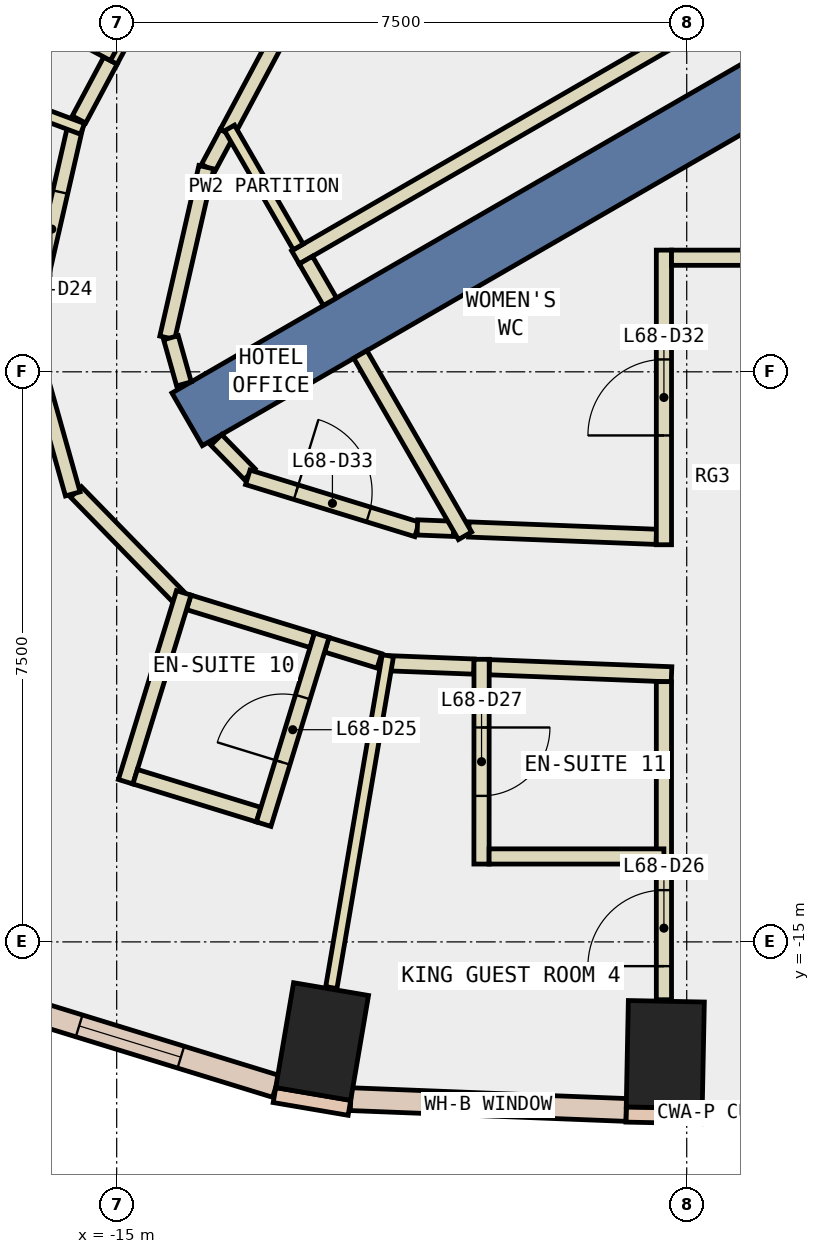
"""IFC4 building model, lengths in metres.
Left out: names, types, materials, properties, quantities, classifications, styles, units other than length and angle.
Written with IfcOpenShell. Run it as: python <this file> out.ifc"""

import sys

from ifc_helpers import new_model, si_unit, direction, frame, frame_2d, origin, origin_2d, place, context, subcontext, project, spatial, polyline, rectangle, outline, extrude, element, fill, save


model = new_model("IFC4")
c1 = context("Model", 3, precision=1e-05, world=origin(), true_north=direction((0.0, 1.0)))
c2 = subcontext(c1, "Body", "Model", "MODEL_VIEW")
j1 = project(units=[si_unit("LENGTHUNIT", "METRE"), si_unit("PLANEANGLEUNIT", "RADIAN")], contexts=[c1])
p1 = place(None, origin())
s1 = spatial("IfcSite", under=j1, at=p1, CompositionType="ELEMENT")
p2 = place(p1, origin())
s2 = spatial("IfcBuilding", under=s1, at=p2, CompositionType="ELEMENT")
p3 = place(p2, frame((0.0, 0.0, 293.6)))
s3 = spatial("IfcBuildingStorey", under=s2, at=p3, CompositionType="ELEMENT", Elevation=293.6)
for number, where, z_axis, x_axis in (
    (1, (-12.297, -16.311, -0.34), (0.0, 0.0, 1.0), (-0.986, 0.168, 0.0)),
    (2, (-7.782, -16.481, -0.34), (0.0, 0.0, 1.0), (-1.0, 0.02, 0.0)),
):
    element("IfcColumn", number, at=place(p3, frame(where, z_axis=z_axis, x_axis=x_axis)), inside=s3, PredefinedType="COLUMN", context=c2, shape_type="SweptSolid", body=[
        extrude(rectangle(XDim=1.0, YDim=1.4, at=origin_2d()), origin(), (0.0, 0.0, 1.0), 3.6),
    ])
p4 = place(p3, frame((0.0, 0.0, -0.34)))
e3 = element("IfcWall", 3, at=p4, inside=s3, PredefinedType="SHEAR", context=c2, shape_type="SweptSolid", body=[
    extrude(outline(polyline([(-9.815, 2.5), (-4.907, -6.0), (-4.619, -5.5), (-9.238, 2.5), (-9.815, 2.5)])), origin(), (0.0, 0.0, 1.0), 3.6),
])
p5 = place(p3, frame((-6.279, -3.625, -0.34), z_axis=(0.0, 0.0, 1.0), x_axis=(-0.866017533419, -0.500013631625, 0.0)))
e4 = element("IfcWall", 4, at=p5, inside=s3, PredefinedType="SHEAR", context=c2, shape_type="SweptSolid", body=[
    extrude(rectangle(XDim=9.0, YDim=0.8, at=frame_2d((4.5, 0.0))), origin(), (0.0, 0.0, 1.0), 3.6),
])
for number, where, z_axis, x_axis in (
    (5, (-12.924, -17.015, 0.0), (0.0, 0.0, 1.0), (0.986, -0.168, 0.0)),
    (6, (-8.298, -17.271, 0.0), (0.0, 0.0, 1.0), (1.0, -0.02, 0.0)),
):
    element("IfcWall", number, at=place(p3, frame(where, z_axis=z_axis, x_axis=x_axis)), inside=s3, PredefinedType="STANDARD", context=c2, shape_type="SweptSolid", body=[
        extrude(rectangle(XDim=1.0, YDim=0.2, at=frame_2d((0.5, 0.0))), origin(), (0.0, 0.0, 1.0), 3.26),
    ])
p6 = place(p3, frame((-11.92, -17.069, 0.0), z_axis=(0.0, 0.0, 1.0), x_axis=(0.999234893779, -0.039110446866, 0.0)))
e7 = element("IfcWall", 7, at=p6, inside=s3, PredefinedType="STANDARD", context=c2, shape_type="SweptSolid", body=[
    extrude(rectangle(XDim=3.627, YDim=0.3, at=frame_2d((1.813, 0.0))), origin(), (0.0, 0.0, 1.0), 3.26),
])
p7 = place(p6, frame((1.113, 0.0, 0.9)))
e8 = element("IfcOpeningElement", 8, at=p7, cuts=e7, PredefinedType="OPENING", context=c2, shape_type="SweptSolid", body=[
    extrude(rectangle(XDim=1.4, YDim=2.0, at=frame_2d((0.7, 1.0))), frame((0.0, 0.16, 0.0), z_axis=(0.0, -1.0, 0.0), x_axis=(1.0, 0.0, 0.0)), (0.0, 0.0, 1.0), 0.32),
])
p8 = place(p3, frame((-16.746, -15.72, 0.0), z_axis=(0.0, 0.0, 1.0), x_axis=(0.955866957005, -0.293799864716, 0.0)))
e9 = element("IfcWall", 9, at=p8, inside=s3, PredefinedType="STANDARD", context=c2, shape_type="SweptSolid", body=[
    extrude(rectangle(XDim=4.02, YDim=0.3, at=frame_2d((2.01, 0.0))), origin(), (0.0, 0.0, 1.0), 3.26),
])
p9 = place(p8, frame((1.31, 0.0, 0.9)))
e10 = element("IfcOpeningElement", 10, at=p9, cuts=e9, PredefinedType="OPENING", context=c2, shape_type="SweptSolid", body=[
    extrude(rectangle(XDim=1.4, YDim=2.0, at=frame_2d((0.7, 1.0))), frame((0.0, 0.16, 0.0), z_axis=(0.0, -1.0, 0.0), x_axis=(1.0, 0.0, 0.0)), (0.0, 0.0, 1.0), 0.32),
])
p10 = place(p3, frame((-10.639, 1.084, 0.0), z_axis=(0.0, 0.0, 1.0), x_axis=(-0.471696599276, -0.881760918975, 0.0)))
e11 = element("IfcWall", 11, at=p10, inside=s3, PredefinedType="PARTITIONING", context=c2, shape_type="SweptSolid", body=[
    extrude(rectangle(XDim=6.172, YDim=0.2, at=frame_2d((3.086, 0.0))), origin(), (0.0, 0.0, 1.0), 3.26),
])
p11 = place(p10, frame((2.458, 0.0, 0.0)))
e12 = element("IfcOpeningElement", 12, at=p11, cuts=e11, PredefinedType="OPENING", context=c2, shape_type="SweptSolid", body=[
    extrude(rectangle(XDim=1.0, YDim=2.1, at=frame_2d((0.5, 1.05))), frame((0.0, 0.11, 0.0), z_axis=(0.0, -1.0, 0.0), x_axis=(1.0, 0.0, 0.0)), (0.0, 0.0, 1.0), 0.22),
])
p12 = place(p3, frame((-10.367, -9.574, 0.0), z_axis=(0.0, 0.0, 1.0), x_axis=(0.999229139158, -0.039257196264, 0.0)))
e13 = element("IfcWall", 13, at=p12, inside=s3, PredefinedType="PARTITIONING", context=c2, shape_type="SweptSolid", body=[
    extrude(rectangle(XDim=2.469, YDim=0.2, at=frame_2d((1.234, 0.0))), origin(), (0.0, 0.0, 1.0), 3.26),
])
p13 = place(p3, frame((-13.55, -4.358, 0.0), z_axis=(0.0, 0.0, 1.0), x_axis=(-0.472169364753, -0.881507850781, 0.0)))
e14 = element("IfcWall", 14, at=p13, inside=s3, PredefinedType="PARTITIONING", context=c2, shape_type="SweptSolid", body=[
    extrude(rectangle(XDim=0.521, YDim=0.2, at=frame_2d((0.26, 0.0))), origin(), (0.0, 0.0, 1.0), 3.26),
])
p14 = place(p3, frame((-13.821, -4.808, 0.0), z_axis=(0.0, 0.0, 1.0), x_axis=(-0.223248099856, -0.97476165595, 0.0)))
e15 = element("IfcWall", 15, at=p14, inside=s3, PredefinedType="PARTITIONING", context=c2, shape_type="SweptSolid", body=[
    extrude(rectangle(XDim=2.302, YDim=0.2, at=frame_2d((1.151, 0.0))), origin(), (0.0, 0.0, 1.0), 3.26),
])
p15 = place(p3, frame((-14.286, -7.051, 0.0), z_axis=(0.0, 0.0, 1.0), x_axis=(0.270633612894, -0.96268242301, 0.0)))
e16 = element("IfcWall", 16, at=p15, inside=s3, PredefinedType="PARTITIONING", context=c2, shape_type="SweptSolid", body=[
    extrude(rectangle(XDim=0.632, YDim=0.2, at=frame_2d((0.316, 0.0))), origin(), (0.0, 0.0, 1.0), 3.26),
])
p16 = place(p3, frame((-13.69, -8.395, 0.0), z_axis=(0.0, 0.0, 1.0), x_axis=(0.698333537371, -0.715772499181, 0.0)))
e17 = element("IfcWall", 17, at=p16, inside=s3, PredefinedType="PARTITIONING", context=c2, shape_type="SweptSolid", body=[
    extrude(rectangle(XDim=0.63, YDim=0.2, at=frame_2d((0.315, 0.0))), origin(), (0.0, 0.0, 1.0), 3.26),
])
p17 = place(p3, frame((-13.275, -8.888, 0.0), z_axis=(0.0, 0.0, 1.0), x_axis=(0.955792602122, -0.294041666654, 0.0)))
e18 = element("IfcWall", 18, at=p17, inside=s3, PredefinedType="PARTITIONING", context=c2, shape_type="SweptSolid", body=[
    extrude(rectangle(XDim=2.33, YDim=0.2, at=frame_2d((1.165, 0.0))), origin(), (0.0, 0.0, 1.0), 3.26),
])
p18 = place(p17, frame((0.665, 0.0, 0.0)))
e19 = element("IfcOpeningElement", 19, at=p18, cuts=e18, PredefinedType="OPENING", context=c2, shape_type="SweptSolid", body=[
    extrude(rectangle(XDim=1.0, YDim=2.1, at=frame_2d((0.5, 1.05))), frame((0.0, 0.11, 0.0), z_axis=(0.0, -1.0, 0.0), x_axis=(1.0, 0.0, 0.0)), (0.0, 0.0, 1.0), 0.22),
])
p19 = place(p3, frame((-11.044, -9.547, 0.0), z_axis=(0.0, 0.0, 1.0), x_axis=(0.999224473046, -0.039375785274, 0.0)))
e20 = element("IfcWall", 20, at=p19, inside=s3, PredefinedType="PARTITIONING", context=c2, shape_type="SweptSolid", body=[
    extrude(rectangle(XDim=0.478, YDim=0.2, at=frame_2d((0.239, 0.0))), origin(), (0.0, 0.0, 1.0), 3.26),
])
p20 = place(p3, frame((-15.496, -4.18, 0.0), z_axis=(0.0, 0.0, 1.0), x_axis=(0.471280380621, 0.881983448167, 0.0)))
e21 = element("IfcWall", 21, at=p20, inside=s3, PredefinedType="PARTITIONING", context=c2, shape_type="SweptSolid", body=[
    extrude(rectangle(XDim=0.879, YDim=0.2, at=frame_2d((0.439, 0.0))), origin(), (0.0, 0.0, 1.0), 3.26),
])
p21 = place(p3, frame((-15.082, -3.405, 0.0), z_axis=(0.0, 0.0, 1.0), x_axis=(0.471719946084, 0.88174842924, 0.0)))
e22 = element("IfcWall", 22, at=p21, inside=s3, PredefinedType="PARTITIONING", context=c2, shape_type="SweptSolid", body=[
    extrude(rectangle(XDim=3.0, YDim=0.2, at=frame_2d((1.5, 0.0))), origin(), (0.0, 0.0, 1.0), 3.26),
])
p22 = place(p3, frame((-11.544, -11.303, 0.0), z_axis=(0.0, 0.0, 1.0), x_axis=(-0.956186468463, 0.292758326147, 0.0)))
e23 = element("IfcWall", 23, at=p22, inside=s3, PredefinedType="PARTITIONING", context=c2, shape_type="SweptSolid", body=[
    extrude(rectangle(XDim=0.724, YDim=0.2, at=frame_2d((0.362, 0.0))), origin(), (0.0, 0.0, 1.0), 3.26),
])
p23 = place(p3, frame((-14.147, -10.503, 0.0), z_axis=(0.0, 0.0, 1.0), x_axis=(-0.698515752779, 0.715594677957, 0.0)))
e24 = element("IfcWall", 24, at=p23, inside=s3, PredefinedType="PARTITIONING", context=c2, shape_type="SweptSolid", body=[
    extrude(rectangle(XDim=1.987, YDim=0.2, at=frame_2d((0.994, 0.0))), origin(), (0.0, 0.0, 1.0), 3.26),
])
p24 = place(p3, frame((-15.578, -9.106, 0.0), z_axis=(0.0, 0.0, 1.0), x_axis=(-0.270688011946, 0.962667128445, 0.0)))
e25 = element("IfcWall", 25, at=p24, inside=s3, PredefinedType="PARTITIONING", context=c2, shape_type="SweptSolid", body=[
    extrude(rectangle(XDim=2.088, YDim=0.2, at=frame_2d((1.044, 0.0))), origin(), (0.0, 0.0, 1.0), 3.26),
])
p25 = place(p3, frame((-16.192, -7.098, 0.0), z_axis=(0.0, 0.0, 1.0), x_axis=(0.22330023395, 0.974749714295, 0.0)))
e26 = element("IfcWall", 26, at=p25, inside=s3, PredefinedType="PARTITIONING", context=c2, shape_type="SweptSolid", body=[
    extrude(rectangle(XDim=2.928, YDim=0.2, at=frame_2d((1.464, 0.0))), origin(), (0.0, 0.0, 1.0), 3.26),
])
p26 = place(p25, frame((1.014, 0.0, 0.0)))
e27 = element("IfcOpeningElement", 27, at=p26, cuts=e26, PredefinedType="OPENING", context=c2, shape_type="SweptSolid", body=[
    extrude(rectangle(XDim=1.0, YDim=2.1, at=frame_2d((0.5, 1.05))), frame((0.0, 0.11, 0.0), z_axis=(0.0, -1.0, 0.0), x_axis=(1.0, 0.0, 0.0)), (0.0, 0.0, 1.0), 0.22),
])
p27 = place(p3, frame((-12.427, -11.032, 0.0), z_axis=(0.0, 0.0, 1.0), x_axis=(-0.955940341053, 0.293561006177, 0.0)))
e28 = element("IfcWall", 28, at=p27, inside=s3, PredefinedType="PARTITIONING", context=c2, shape_type="SweptSolid", body=[
    extrude(rectangle(XDim=1.7, YDim=0.2, at=frame_2d((0.85, 0.0))), origin(), (0.0, 0.0, 1.0), 3.26),
])
p28 = place(p3, frame((-10.299, -11.378, 0.0), z_axis=(0.0, 0.0, 1.0), x_axis=(-0.999237995813, 0.03903111224, 0.0)))
e29 = element("IfcWall", 29, at=p28, inside=s3, PredefinedType="PARTITIONING", context=c2, shape_type="SweptSolid", body=[
    extrude(rectangle(XDim=1.176, YDim=0.2, at=frame_2d((0.588, 0.0))), origin(), (0.0, 0.0, 1.0), 3.26),
])
p29 = place(p3, frame((-7.7, -11.48, 0.0), z_axis=(0.0, 0.0, 1.0), x_axis=(-0.999233433291, 0.039147743138, 0.0)))
e30 = element("IfcWall", 30, at=p29, inside=s3, PredefinedType="PARTITIONING", context=c2, shape_type="SweptSolid", body=[
    extrude(rectangle(XDim=2.401, YDim=0.2, at=frame_2d((1.201, 0.0))), origin(), (0.0, 0.0, 1.0), 3.26),
])
p30 = place(p3, frame((-7.8, -9.775, 0.0), z_axis=(0.0, 0.0, 1.0), x_axis=(0.0, 1.0, 0.0)))
e31 = element("IfcWall", 31, at=p30, inside=s3, PredefinedType="PARTITIONING", context=c2, shape_type="SweptSolid", body=[
    extrude(rectangle(XDim=3.876, YDim=0.2, at=frame_2d((1.938, 0.0))), origin(), (0.0, 0.0, 1.0), 3.26),
])
p31 = place(p30, frame((1.438, 0.0, 0.0)))
e32 = element("IfcOpeningElement", 32, at=p31, cuts=e31, PredefinedType="OPENING", context=c2, shape_type="SweptSolid", body=[
    extrude(rectangle(XDim=1.0, YDim=2.1, at=frame_2d((0.5, 1.05))), frame((0.0, 0.11, 0.0), z_axis=(0.0, -1.0, 0.0), x_axis=(1.0, 0.0, 0.0)), (0.0, 0.0, 1.0), 0.22),
])
p32 = place(p3, frame((-7.7, -5.999, 0.0), z_axis=(0.0, 0.0, 1.0), x_axis=(1.0, 0.0, 0.0)))
e33 = element("IfcWall", 33, at=p32, inside=s3, PredefinedType="PARTITIONING", context=c2, shape_type="SweptSolid", body=[
    extrude(rectangle(XDim=2.792, YDim=0.2, at=frame_2d((1.396, 0.0))), origin(), (0.0, 0.0, 1.0), 3.26),
])
p33 = place(p3, frame((-7.8, -15.761, 0.0), z_axis=(0.0, 0.0, 1.0), x_axis=(0.0, 1.0, 0.0)))
e34 = element("IfcWall", 34, at=p33, inside=s3, PredefinedType="PARTITIONING", context=c2, shape_type="SweptSolid", body=[
    extrude(rectangle(XDim=1.785, YDim=0.2, at=frame_2d((0.893, 0.0))), origin(), (0.0, 0.0, 1.0), 3.26),
])
p34 = place(p33, frame((0.442, 0.0, 0.0)))
e35 = element("IfcOpeningElement", 35, at=p34, cuts=e34, PredefinedType="OPENING", context=c2, shape_type="SweptSolid", body=[
    extrude(rectangle(XDim=1.0, YDim=2.1, at=frame_2d((0.5, 1.05))), frame((0.0, 0.11, 0.0), z_axis=(0.0, -1.0, 0.0), x_axis=(1.0, 0.0, 0.0)), (0.0, 0.0, 1.0), 0.22),
])
p35 = place(p3, frame((-7.8, -13.976, 0.0), z_axis=(0.0, 0.0, 1.0), x_axis=(0.0, 1.0, 0.0)))
e36 = element("IfcWall", 36, at=p35, inside=s3, PredefinedType="PARTITIONING", context=c2, shape_type="SweptSolid", body=[
    extrude(rectangle(XDim=2.4, YDim=0.2, at=frame_2d((1.2, 0.0))), origin(), (0.0, 0.0, 1.0), 3.26),
])
p36 = place(p3, frame((-6.845, -2.643, 0.0), z_axis=(0.0, 0.0, 1.0), x_axis=(-0.865994457699, -0.500053596362, 0.0)))
e37 = element("IfcWall", 37, at=p36, inside=s3, PredefinedType="PARTITIONING", context=c2, shape_type="SweptSolid", body=[
    extrude(rectangle(XDim=6.701, YDim=0.2, at=frame_2d((3.351, 0.0))), origin(), (0.0, 0.0, 1.0), 3.26),
])
p37 = place(p3, frame((-12.611, -5.857, 0.0), z_axis=(0.0, 0.0, 1.0), x_axis=(-0.500120037633, 0.865956088932, 0.0)))
e38 = element("IfcWall", 38, at=p37, inside=s3, PredefinedType="PARTITIONING", context=c2, shape_type="SweptSolid", body=[
    extrude(rectangle(XDim=1.807, YDim=0.15, at=frame_2d((0.904, 0.0))), origin(), (0.0, 0.0, 1.0), 3.26),
])
p38 = place(p3, frame((-10.417, -9.657, 0.0), z_axis=(0.0, 0.0, 1.0), x_axis=(-0.499837531988, 0.866119184418, 0.0)))
e39 = element("IfcWall", 39, at=p38, inside=s3, PredefinedType="PARTITIONING", context=c2, shape_type="SweptSolid", body=[
    extrude(rectangle(XDim=2.755, YDim=0.2, at=frame_2d((1.377, 0.0))), origin(), (0.0, 0.0, 1.0), 3.26),
])
p39 = place(p3, frame((-17.239, -2.137, 0.0), z_axis=(0.0, 0.0, 1.0), x_axis=(0.881706262609, -0.471798756332, 0.0)))
e40 = element("IfcWall", 40, at=p39, inside=s3, PredefinedType="PARTITIONING", context=c2, shape_type="SweptSolid", body=[
    extrude(rectangle(XDim=2.501, YDim=0.2, at=frame_2d((1.25, 0.0))), origin(), (0.0, 0.0, 1.0), 3.26),
])
p40 = place(p3, frame((-15.45, -4.304, 0.0), z_axis=(0.0, 0.0, 1.0), x_axis=(-0.936458128132, 0.350779381172, 0.0)))
e41 = element("IfcWall", 41, at=p40, inside=s3, PredefinedType="PARTITIONING", context=c2, shape_type="SweptSolid", body=[
    extrude(rectangle(XDim=4.433, YDim=0.15, at=frame_2d((2.216, 0.0))), origin(), (0.0, 0.0, 1.0), 3.26),
])
p41 = place(p3, frame((-14.118, -10.408, 0.0), z_axis=(0.0, 0.0, 1.0), x_axis=(-0.293914282011, -0.955831781659, 0.0)))
e42 = element("IfcWall", 42, at=p41, inside=s3, PredefinedType="PARTITIONING", context=c2, shape_type="SweptSolid", body=[
    extrude(rectangle(XDim=2.6, YDim=0.2, at=frame_2d((1.3, 0.0))), origin(), (0.0, 0.0, 1.0), 3.26),
])
p42 = place(p3, frame((-14.757, -12.827, 0.0), z_axis=(0.0, 0.0, 1.0), x_axis=(0.955940341053, -0.293561006177, 0.0)))
e43 = element("IfcWall", 43, at=p42, inside=s3, PredefinedType="PARTITIONING", context=c2, shape_type="SweptSolid", body=[
    extrude(rectangle(XDim=1.7, YDim=0.2, at=frame_2d((0.85, 0.0))), origin(), (0.0, 0.0, 1.0), 3.26),
])
p43 = place(p3, frame((-13.066, -13.451, 0.0), z_axis=(0.0, 0.0, 1.0), x_axis=(0.293854864179, 0.955850050373, 0.0)))
e44 = element("IfcWall", 44, at=p43, inside=s3, PredefinedType="PARTITIONING", context=c2, shape_type="SweptSolid", body=[
    extrude(rectangle(XDim=2.6, YDim=0.2, at=frame_2d((1.3, 0.0))), origin(), (0.0, 0.0, 1.0), 3.26),
])
p44 = place(p43, frame((0.85, 0.0, 0.0)))
e45 = element("IfcOpeningElement", 45, at=p44, cuts=e44, PredefinedType="OPENING", context=c2, shape_type="SweptSolid", body=[
    extrude(rectangle(XDim=0.9, YDim=2.1, at=frame_2d((0.45, 1.05))), frame((0.0, 0.11, 0.0), z_axis=(0.0, -1.0, 0.0), x_axis=(1.0, 0.0, 0.0)), (0.0, 0.0, 1.0), 0.22),
])
p45 = place(p3, frame((-11.432, -11.234, 0.0), z_axis=(0.0, 0.0, 1.0), x_axis=(-0.16797255243, -0.98579167253, 0.0)))
e46 = element("IfcWall", 46, at=p45, inside=s3, PredefinedType="PARTITIONING", context=c2, shape_type="SweptSolid", body=[
    extrude(rectangle(XDim=4.43, YDim=0.15, at=frame_2d((2.215, 0.0))), origin(), (0.0, 0.0, 1.0), 3.26),
])
p46 = place(p3, frame((-10.199, -11.282, 0.0), z_axis=(0.0, 0.0, 1.0), x_axis=(-0.000362482985, -0.999999934303, 0.0)))
e47 = element("IfcWall", 47, at=p46, inside=s3, PredefinedType="PARTITIONING", context=c2, shape_type="SweptSolid", body=[
    extrude(rectangle(XDim=2.694, YDim=0.2, at=frame_2d((1.347, 0.0))), origin(), (0.0, 0.0, 1.0), 3.26),
])
p47 = place(p46, frame((0.897, 0.0, 0.0)))
e48 = element("IfcOpeningElement", 48, at=p47, cuts=e47, PredefinedType="OPENING", context=c2, shape_type="SweptSolid", body=[
    extrude(rectangle(XDim=0.9, YDim=2.1, at=frame_2d((0.45, 1.05))), frame((0.0, 0.11, 0.0), z_axis=(0.0, -1.0, 0.0), x_axis=(1.0, 0.0, 0.0)), (0.0, 0.0, 1.0), 0.22),
])
p48 = place(p3, frame((-10.1, -13.876, 0.0), z_axis=(0.0, 0.0, 1.0), x_axis=(1.0, 0.0, 0.0)))
e49 = element("IfcWall", 49, at=p48, inside=s3, PredefinedType="PARTITIONING", context=c2, shape_type="SweptSolid", body=[
    extrude(rectangle(XDim=2.3, YDim=0.2, at=frame_2d((1.15, 0.0))), origin(), (0.0, 0.0, 1.0), 3.26),
])
p49 = place(p3, frame((-12.194, -6.578, 0.0), z_axis=(0.0, 0.0, 1.0), x_axis=(-0.500701704226, 0.865619895442, 0.0)))
e50 = element("IfcWall", 50, at=p49, inside=s3, PredefinedType="PARTITIONING", context=c2, shape_type="SweptSolid", body=[
    extrude(rectangle(XDim=0.633, YDim=0.2, at=frame_2d((0.316, 0.0))), origin(), (0.0, 0.0, 1.0), 3.26),
])
p50 = place(p3, frame((-8.192, 0.888, 0.0), z_axis=(0.0, 0.0, 1.0), x_axis=(0.500034260056, -0.866005622828, 0.0)))
e51 = element("IfcWall", 51, at=p50, inside=s3, PredefinedType="STANDARD", context=c2, shape_type="SweptSolid", body=[
    extrude(rectangle(XDim=5.399, YDim=0.2, at=frame_2d((2.7, 0.0))), origin(), (0.0, 0.0, 1.0), 3.26),
])
p51 = place(p7, origin())
e52 = element("IfcWindow", 52, at=p51, inside=s3, PartitioningType="SINGLE_PANEL", PredefinedType="WINDOW", context=c2, shape_type="SweptSolid", body=[
    extrude(rectangle(XDim=1.4, YDim=2.0, at=frame_2d((0.7, 1.0))), frame((0.0, 0.03, 0.0), z_axis=(0.0, -1.0, 0.0), x_axis=(1.0, 0.0, 0.0)), (0.0, 0.0, 1.0), 0.06),
])
fill(e8, e52)
p52 = place(p9, origin())
e53 = element("IfcWindow", 53, at=p52, inside=s3, PartitioningType="SINGLE_PANEL", PredefinedType="WINDOW", context=c2, shape_type="SweptSolid", body=[
    extrude(rectangle(XDim=1.4, YDim=2.0, at=frame_2d((0.7, 1.0))), frame((0.0, 0.03, 0.0), z_axis=(0.0, -1.0, 0.0), x_axis=(1.0, 0.0, 0.0)), (0.0, 0.0, 1.0), 0.06),
])
fill(e10, e53)
p53 = place(p26, origin())
e54 = element("IfcDoor", 54, at=p53, inside=s3, OperationType="SINGLE_SWING_LEFT", PredefinedType="DOOR", context=c2, shape_type="SweptSolid", body=[
    extrude(rectangle(XDim=1.0, YDim=2.1, at=frame_2d((0.5, 1.05))), frame((0.0, 0.025, 0.0), z_axis=(0.0, -1.0, 0.0), x_axis=(1.0, 0.0, 0.0)), (0.0, 0.0, 1.0), 0.05),
])
fill(e27, e54)
p54 = place(p44, origin())
e55 = element("IfcDoor", 55, at=p54, inside=s3, OperationType="SINGLE_SWING_LEFT", PredefinedType="DOOR", context=c2, shape_type="SweptSolid", body=[
    extrude(rectangle(XDim=0.9, YDim=2.1, at=frame_2d((0.45, 1.05))), frame((0.0, 0.025, 0.0), z_axis=(0.0, -1.0, 0.0), x_axis=(1.0, 0.0, 0.0)), (0.0, 0.0, 1.0), 0.05),
])
fill(e45, e55)
p55 = place(p34, origin())
e56 = element("IfcDoor", 56, at=p55, inside=s3, OperationType="SINGLE_SWING_RIGHT", PredefinedType="DOOR", context=c2, shape_type="SweptSolid", body=[
    extrude(rectangle(XDim=1.0, YDim=2.1, at=frame_2d((0.5, 1.05))), frame((0.0, 0.025, 0.0), z_axis=(0.0, -1.0, 0.0), x_axis=(1.0, 0.0, 0.0)), (0.0, 0.0, 1.0), 0.05),
])
fill(e35, e56)
p56 = place(p47, origin())
e57 = element("IfcDoor", 57, at=p56, inside=s3, OperationType="SINGLE_SWING_LEFT", PredefinedType="DOOR", context=c2, shape_type="SweptSolid", body=[
    extrude(rectangle(XDim=0.9, YDim=2.1, at=frame_2d((0.45, 1.05))), frame((0.0, 0.025, 0.0), z_axis=(0.0, -1.0, 0.0), x_axis=(1.0, 0.0, 0.0)), (0.0, 0.0, 1.0), 0.05),
])
fill(e48, e57)
p57 = place(p31, origin())
e58 = element("IfcDoor", 58, at=p57, inside=s3, OperationType="SINGLE_SWING_LEFT", PredefinedType="DOOR", context=c2, shape_type="SweptSolid", body=[
    extrude(rectangle(XDim=1.0, YDim=2.1, at=frame_2d((0.5, 1.05))), frame((0.0, 0.025, 0.0), z_axis=(0.0, -1.0, 0.0), x_axis=(1.0, 0.0, 0.0)), (0.0, 0.0, 1.0), 0.05),
])
fill(e32, e58)
p58 = place(p18, origin())
e59 = element("IfcDoor", 59, at=p58, inside=s3, OperationType="SINGLE_SWING_LEFT", PredefinedType="DOOR", context=c2, shape_type="SweptSolid", body=[
    extrude(rectangle(XDim=1.0, YDim=2.1, at=frame_2d((0.5, 1.05))), frame((0.0, 0.025, 0.0), z_axis=(0.0, -1.0, 0.0), x_axis=(1.0, 0.0, 0.0)), (0.0, 0.0, 1.0), 0.05),
])
fill(e19, e59)
save(model, sys.argv[1])
